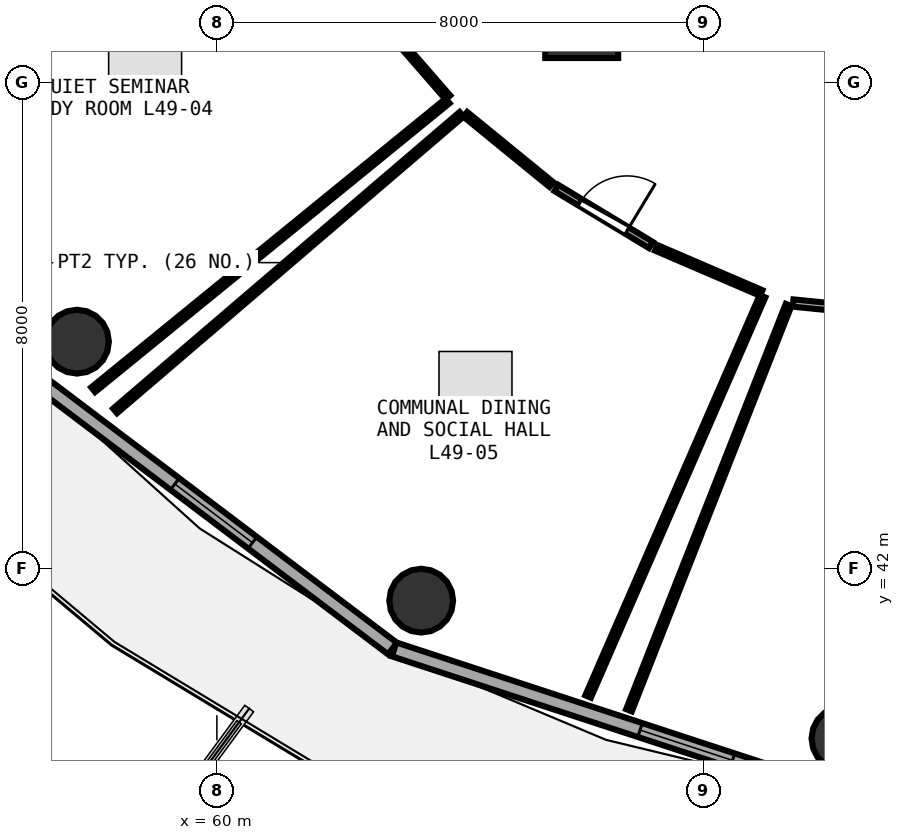
"""IFC4 building model, lengths in metres.
Left out: names, types, materials, properties, quantities, classifications, styles, units other than length and angle.
Written with IfcOpenShell. Run it as: python <this file> out.ifc"""

import sys

from ifc_helpers import new_model, si_unit, direction, frame, frame_2d, origin, origin_2d, place, context, subcontext, project, spatial, rectangle, circle, extrude, element, fill, save


model = new_model("IFC4")
c1 = context("Model", 3, precision=1e-05, world=origin(), true_north=direction((0.0, 1.0)))
c2 = subcontext(c1, "Body", "Model", "MODEL_VIEW")
j1 = project(units=[si_unit("LENGTHUNIT", "METRE"), si_unit("PLANEANGLEUNIT", "RADIAN")], contexts=[c1])
p1 = place(None, origin())
s1 = spatial("IfcSite", under=j1, at=p1, CompositionType="ELEMENT")
p2 = place(p1, origin())
s2 = spatial("IfcBuilding", under=s1, at=p2, CompositionType="ELEMENT")
p3 = place(p2, frame((0.0, 0.0, 193.2)))
s3 = spatial("IfcBuildingStorey", under=s2, at=p3, CompositionType="ELEMENT", Elevation=193.2)
p4 = place(p3, frame((66.0, 51.0, 0.0), z_axis=(0.0, 0.0, 1.0), x_axis=(1.0, 0.0, 0.0)))
e1 = element("IfcColumn", 1, at=p4, inside=s3, PredefinedType="PILASTER", context=c2, shape_type="SweptSolid", body=[
    extrude(rectangle(XDim=1.2, YDim=1.2, at=origin_2d()), origin(), (0.0, 0.0, 1.0), 3.75),
])
for number, where, z_axis, x_axis in (
    (2, (57.698, 45.736, 0.0), (0.0, 0.0, 1.0), (1.0, 0.0, 0.0)),
    (3, (63.36, 41.476, 0.0), (0.0, 0.0, 1.0), (1.0, 0.0, 0.0)),
    (4, (70.305, 39.21, 0.0), (0.0, 0.0, 1.0), (1.0, 0.0, 0.0)),
):
    element("IfcColumn", number, at=place(p3, frame(where, z_axis=z_axis, x_axis=x_axis)), inside=s3, PredefinedType="COLUMN", context=c2, shape_type="SweptSolid", body=[
        extrude(circle(Radius=0.525, at=origin_2d()), origin(), (0.0, 0.0, 1.0), 3.75),
    ])
p5 = place(p3, frame((57.006, 45.135, 0.0), z_axis=(0.0, 0.0, 1.0), x_axis=(0.797701674595, -0.603052268338, 0.0)))
e5 = element("IfcWall", 5, at=p5, inside=s3, PredefinedType="SOLIDWALL", context=c2, shape_type="SweptSolid", body=[
    extrude(rectangle(XDim=7.374, YDim=0.24, at=frame_2d((3.687, 0.0))), origin(), (0.0, 0.0, 1.0), 3.475),
])
p6 = place(p5, frame((2.887, 0.0, 0.85)))
e6 = element("IfcOpeningElement", 6, at=p6, cuts=e5, PredefinedType="OPENING", context=c2, shape_type="SweptSolid", body=[
    extrude(rectangle(XDim=1.6, YDim=1.45, at=frame_2d((0.8, 0.725))), frame((0.0, 0.13, 0.0), z_axis=(0.0, -1.0, 0.0), x_axis=(1.0, 0.0, 0.0)), (0.0, 0.0, 1.0), 0.26),
])
p7 = place(p3, frame((62.914, 40.675, 0.0), z_axis=(0.0, 0.0, 1.0), x_axis=(0.95022142767, -0.31157541366, 0.0)))
e7 = element("IfcWall", 7, at=p7, inside=s3, PredefinedType="SOLIDWALL", context=c2, shape_type="SweptSolid", body=[
    extrude(rectangle(XDim=7.594, YDim=0.24, at=frame_2d((3.797, 0.0))), origin(), (0.0, 0.0, 1.0), 3.475),
])
p8 = place(p7, frame((4.257, 0.0, 0.85)))
e8 = element("IfcOpeningElement", 8, at=p8, cuts=e7, PredefinedType="OPENING", context=c2, shape_type="SweptSolid", body=[
    extrude(rectangle(XDim=1.6, YDim=1.45, at=frame_2d((0.8, 0.725))), frame((0.0, 0.13, 0.0), z_axis=(0.0, -1.0, 0.0), x_axis=(1.0, 0.0, 0.0)), (0.0, 0.0, 1.0), 0.26),
])
p9 = place(p3, frame((69.477, 46.371, 0.0), z_axis=(0.0, 0.0, 1.0), x_axis=(0.995024530457, -0.099630235311, 0.0)))
e9 = element("IfcWall", 9, at=p9, inside=s3, PredefinedType="PARTITIONING", context=c2, shape_type="SweptSolid", body=[
    extrude(rectangle(XDim=6.114, YDim=0.12, at=frame_2d((3.057, 0.0))), origin(), (0.0, 0.0, 1.0), 3.025),
])
p10 = place(p9, frame((2.607, 0.0, 0.0)))
e10 = element("IfcOpeningElement", 10, at=p10, cuts=e9, PredefinedType="OPENING", context=c2, shape_type="SweptSolid", body=[
    extrude(rectangle(XDim=0.9, YDim=2.08, at=frame_2d((0.45, 1.04))), frame((0.0, 0.07, 0.0), z_axis=(0.0, -1.0, 0.0), x_axis=(1.0, 0.0, 0.0)), (0.0, 0.0, 1.0), 0.14),
])
p11 = place(p3, frame((65.583, 48.263, 0.0), z_axis=(0.0, 0.0, 1.0), x_axis=(0.856160990593, -0.516709162089, 0.0)))
e11 = element("IfcWall", 11, at=p11, inside=s3, PredefinedType="PARTITIONING", context=c2, shape_type="SweptSolid", body=[
    extrude(rectangle(XDim=1.815, YDim=0.12, at=frame_2d((0.908, 0.0))), origin(), (0.0, 0.0, 1.0), 3.48),
])
p12 = place(p11, frame((0.458, 0.0, 0.0)))
e12 = element("IfcOpeningElement", 12, at=p12, cuts=e11, PredefinedType="OPENING", context=c2, shape_type="SweptSolid", body=[
    extrude(rectangle(XDim=0.9, YDim=2.08, at=frame_2d((0.45, 1.04))), frame((0.0, 0.07, 0.0), z_axis=(0.0, -1.0, 0.0), x_axis=(1.0, 0.0, 0.0)), (0.0, 0.0, 1.0), 0.14),
])
p13 = place(p3, frame((66.778, 39.674, 0.0), z_axis=(0.0, 0.0, 1.0), x_axis=(0.366396673382, 0.930458745853, 0.0)))
e13 = element("IfcWall", 13, at=p13, inside=s3, PredefinedType="PARTITIONING", context=c2, shape_type="SweptSolid", body=[
    extrude(rectangle(XDim=7.164, YDim=0.1, at=frame_2d((3.582, 0.0))), origin(), (0.0, 0.0, 1.0), 3.075),
])
p14 = place(p3, frame((62.622, 51.104, 0.0), z_axis=(0.0, 0.0, 1.0), x_axis=(0.656613410786, -0.754227305775, 0.0)))
e14 = element("IfcWall", 14, at=p14, inside=s3, PredefinedType="PARTITIONING", context=c2, shape_type="SweptSolid", body=[
    extrude(rectangle(XDim=1.793, YDim=0.1, at=frame_2d((0.896, 0.0))), origin(), (0.0, 0.0, 1.0), 3.025),
])
p15 = place(p3, frame((63.795, 49.696, 0.0), z_axis=(0.0, 0.0, 1.0), x_axis=(-0.775218498775, -0.631693184353, 0.0)))
e15 = element("IfcWall", 15, at=p15, inside=s3, PredefinedType="PARTITIONING", context=c2, shape_type="SweptSolid", body=[
    extrude(rectangle(XDim=7.52, YDim=0.1, at=frame_2d((3.76, 0.0))), origin(), (0.0, 0.0, 1.0), 3.025),
])
p16 = place(p3, frame((64.085, 49.475, 0.0), z_axis=(0.0, 0.0, 1.0), x_axis=(0.774837468284, -0.632160499986, 0.0)))
e16 = element("IfcWall", 16, at=p16, inside=s3, PredefinedType="PARTITIONING", context=c2, shape_type="SweptSolid", body=[
    extrude(rectangle(XDim=1.827, YDim=0.1, at=frame_2d((0.914, 0.0))), origin(), (0.0, 0.0, 1.0), 3.025),
])
p17 = place(p3, frame((67.226, 47.278, 0.0), z_axis=(0.0, 0.0, 1.0), x_axis=(0.918768567592, -0.394796554196, 0.0)))
e17 = element("IfcWall", 17, at=p17, inside=s3, PredefinedType="PARTITIONING", context=c2, shape_type="SweptSolid", body=[
    extrude(rectangle(XDim=1.881, YDim=0.1, at=frame_2d((0.94, 0.0))), origin(), (0.0, 0.0, 1.0), 3.235),
])
p18 = place(p3, frame((68.974, 46.483, 0.0), z_axis=(0.0, 0.0, 1.0), x_axis=(-0.399504113712, -0.916731401844, 0.0)))
e18 = element("IfcWall", 18, at=p18, inside=s3, PredefinedType="PARTITIONING", context=c2, shape_type="SweptSolid", body=[
    extrude(rectangle(XDim=7.182, YDim=0.1, at=frame_2d((3.591, 0.0))), origin(), (0.0, 0.0, 1.0), 3.075),
])
p19 = place(p3, frame((58.325, 44.597, 0.0), z_axis=(0.0, 0.0, 1.0), x_axis=(0.759718239, 0.650252410476, 0.0)))
e19 = element("IfcWall", 19, at=p19, inside=s3, PredefinedType="PARTITIONING", context=c2, shape_type="SweptSolid", body=[
    extrude(rectangle(XDim=7.5, YDim=0.1, at=frame_2d((3.75, 0.0))), origin(), (0.0, 0.0, 1.0), 3.075),
])
p20 = place(p6, origin())
e20 = element("IfcWindow", 20, at=p20, inside=s3, PartitioningType="SINGLE_PANEL", PredefinedType="WINDOW", context=c2, shape_type="SweptSolid", body=[
    extrude(rectangle(XDim=1.6, YDim=1.45, at=frame_2d((0.8, 0.725))), frame((0.0, 0.03, 0.0), z_axis=(0.0, -1.0, 0.0), x_axis=(1.0, 0.0, 0.0)), (0.0, 0.0, 1.0), 0.06),
])
fill(e6, e20)
p21 = place(p8, origin())
e21 = element("IfcWindow", 21, at=p21, inside=s3, PartitioningType="SINGLE_PANEL", PredefinedType="WINDOW", context=c2, shape_type="SweptSolid", body=[
    extrude(rectangle(XDim=1.6, YDim=1.45, at=frame_2d((0.8, 0.725))), frame((0.0, 0.03, 0.0), z_axis=(0.0, -1.0, 0.0), x_axis=(1.0, 0.0, 0.0)), (0.0, 0.0, 1.0), 0.06),
])
fill(e8, e21)
p22 = place(p12, origin())
e22 = element("IfcDoor", 22, at=p22, inside=s3, OperationType="SINGLE_SWING_RIGHT", PredefinedType="DOOR", context=c2, shape_type="SweptSolid", body=[
    extrude(rectangle(XDim=0.9, YDim=2.08, at=frame_2d((0.45, 1.04))), frame((0.0, 0.025, 0.0), z_axis=(0.0, -1.0, 0.0), x_axis=(1.0, 0.0, 0.0)), (0.0, 0.0, 1.0), 0.05),
])
fill(e12, e22)
save(model, sys.argv[1])
